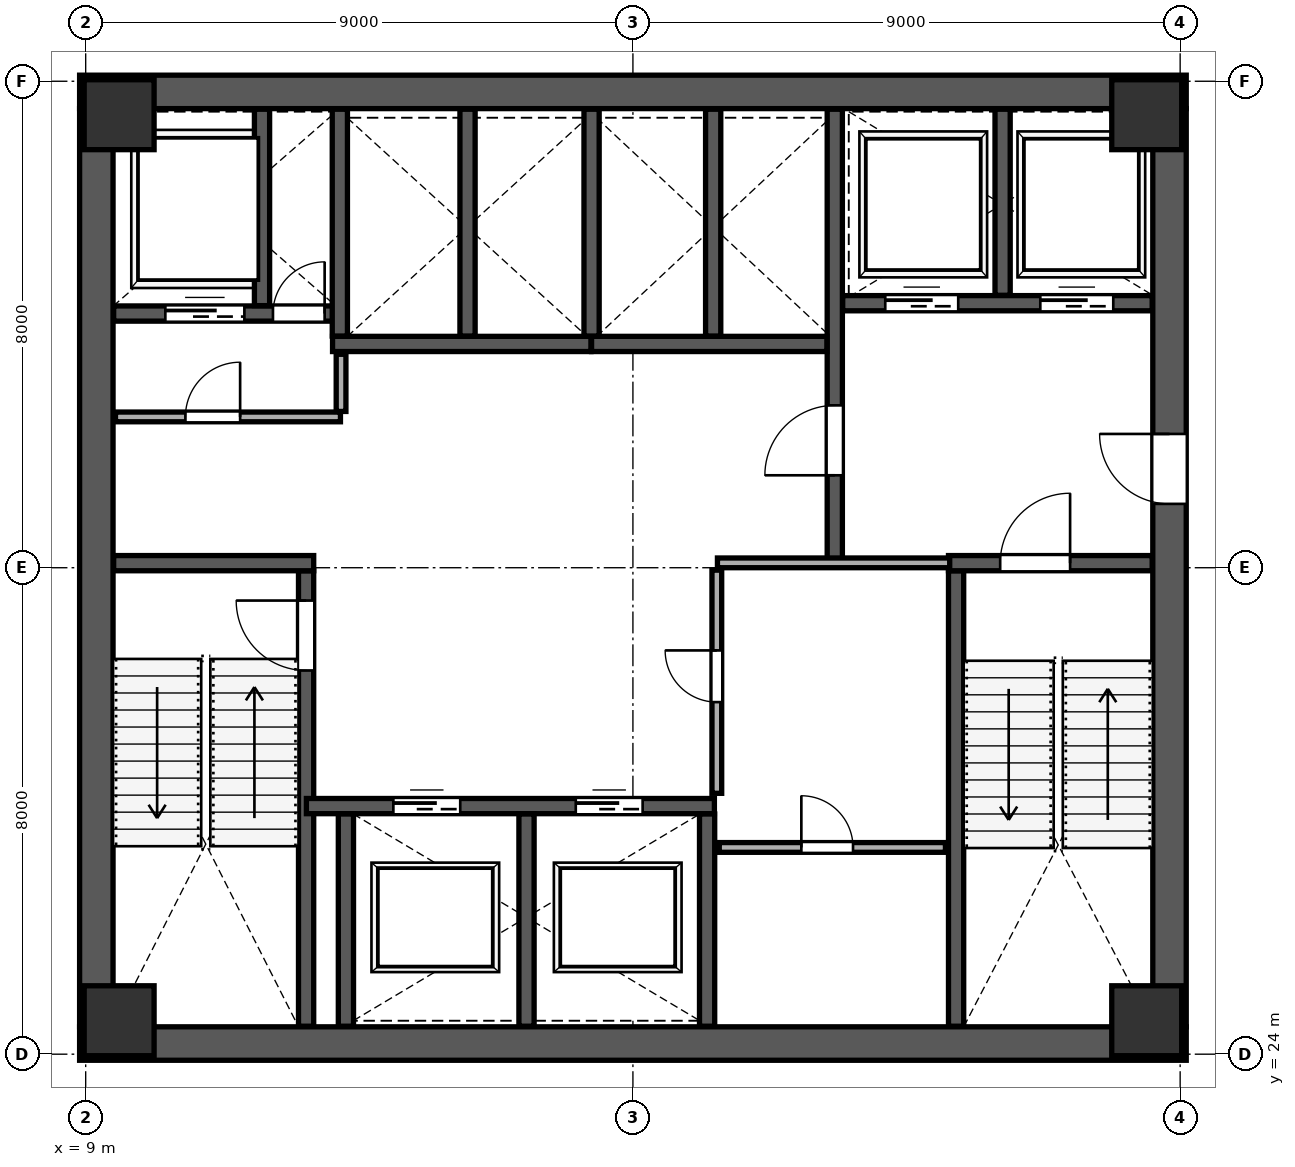
"""IFC4 building model, lengths in metres.
Left out: names, types, materials, properties, quantities, classifications, styles, units other than length and angle.
Written with IfcOpenShell. Run it as: python <this file> out.ifc"""

import sys

from ifc_helpers import new_model, si_unit, direction, frame, frame_2d, origin, origin_2d, place, context, subcontext, project, spatial, rectangle, extrude, source, transform, mapped, element, fill, save


model = new_model("IFC4")
c1 = context("Model", 3, precision=1e-05, world=origin(), true_north=direction((0.0, 1.0)))
c2 = subcontext(c1, "Body", "Model", "MODEL_VIEW")
j1 = project(units=[si_unit("LENGTHUNIT", "METRE"), si_unit("PLANEANGLEUNIT", "RADIAN")], contexts=[c1])
p1 = place(None, origin())
s1 = spatial("IfcSite", under=j1, at=p1, CompositionType="ELEMENT")
p2 = place(p1, origin())
s2 = spatial("IfcBuilding", under=s1, at=p2, CompositionType="ELEMENT")
p3 = place(p2, frame((0.0, 0.0, 70.6)))
s3 = spatial("IfcBuildingStorey", under=s2, at=p3, CompositionType="ELEMENT", Elevation=70.6)
m1 = source(origin(), c2, "Body", "SweptSolid", [
    extrude(rectangle(XDim=1.15, YDim=1.15, at=origin_2d()), origin(), (0.0, 0.0, 1.0), 4.198),
])
for number, where, z_axis, x_axis in (
    (1, (9.55, 24.55, 0.001), (0.0, 0.0, 1.0), (1.0, 0.0, 0.0)),
    (2, (26.45, 24.55, 0.001), (0.0, 0.0, 1.0), (1.0, 0.0, 0.0)),
    (3, (9.55, 39.45, 0.001), (0.0, 0.0, 1.0), (1.0, 0.0, 0.0)),
    (4, (26.45, 39.45, 0.001), (0.0, 0.0, 1.0), (1.0, 0.0, 0.0)),
):
    element("IfcColumn", number, at=place(p3, frame(where, z_axis=z_axis, x_axis=x_axis)), inside=s3, PredefinedType="COLUMN", context=c2, shape_type="MappedRepresentation", body=[
        mapped(m1, transform((0.0, 0.0, 0.0), scale=1.0)),
    ])
p4 = place(p3, frame((9.175, 24.45, 0.0), z_axis=(0.0, 0.0, 1.0), x_axis=(0.0, 1.0, 0.0)))
e5 = element("IfcWall", 5, at=p4, inside=s3, PredefinedType="SHEAR", context=c2, shape_type="SweptSolid", body=[
    extrude(rectangle(XDim=15.1, YDim=0.55, at=frame_2d((7.55, 0.0))), origin(), (0.0, 0.0, 1.0), 3.96),
])
p5 = place(p3, frame((26.825, 24.45, 0.0), z_axis=(0.0, 0.0, 1.0), x_axis=(0.0, 1.0, 0.0)))
e6 = element("IfcWall", 6, at=p5, inside=s3, PredefinedType="SHEAR", context=c2, shape_type="SweptSolid", body=[
    extrude(rectangle(XDim=15.1, YDim=0.55, at=frame_2d((7.55, 0.0))), origin(), (0.0, 0.0, 1.0), 3.96),
])
p6 = place(p5, frame((8.6, 0.0, 0.0)))
e7 = element("IfcOpeningElement", 7, at=p6, cuts=e6, PredefinedType="OPENING", context=c2, shape_type="SweptSolid", body=[
    extrude(rectangle(XDim=1.15, YDim=2.2, at=frame_2d((0.575, 1.1))), frame((0.0, 0.285, 0.0), z_axis=(0.0, -1.0, 0.0), x_axis=(1.0, 0.0, 0.0)), (0.0, 0.0, 1.0), 0.57),
])
for number, where, z_axis, x_axis in (
    (8, (8.9, 24.175, 0.0), (0.0, 0.0, 1.0), (1.0, 0.0, 0.0)),
    (9, (8.9, 39.825, 0.0), (0.0, 0.0, 1.0), (1.0, 0.0, 0.0)),
):
    element("IfcWall", number, at=place(p3, frame(where, z_axis=z_axis, x_axis=x_axis)), inside=s3, PredefinedType="SHEAR", context=c2, shape_type="SweptSolid", body=[
        extrude(rectangle(XDim=18.2, YDim=0.55, at=frame_2d((9.1, 0.0))), origin(), (0.0, 0.0, 1.0), 3.96),
    ])
p7 = place(p3, frame((12.625, 24.46, 0.0), z_axis=(0.0, 0.0, 1.0), x_axis=(0.0, 1.0, 0.0)))
e10 = element("IfcWall", 10, at=p7, inside=s3, PredefinedType="SHEAR", context=c2, shape_type="SweptSolid", body=[
    extrude(rectangle(XDim=7.49, YDim=0.25, at=frame_2d((3.745, 0.0))), origin(), (0.0, 0.0, 1.0), 3.96),
])
p8 = place(p7, frame((5.85, 0.0, 0.0)))
e11 = element("IfcOpeningElement", 11, at=p8, cuts=e10, PredefinedType="OPENING", context=c2, shape_type="SweptSolid", body=[
    extrude(rectangle(XDim=1.15, YDim=2.2, at=frame_2d((0.575, 1.1))), frame((0.0, 0.135, 0.0), z_axis=(0.0, -1.0, 0.0), x_axis=(1.0, 0.0, 0.0)), (0.0, 0.0, 1.0), 0.27),
])
p9 = place(p3, frame((9.46, 32.075, 0.0), z_axis=(0.0, 0.0, 1.0), x_axis=(1.0, 0.0, 0.0)))
e12 = element("IfcWall", 12, at=p9, inside=s3, PredefinedType="SHEAR", context=c2, shape_type="SweptSolid", body=[
    extrude(rectangle(XDim=3.29, YDim=0.25, at=frame_2d((1.645, 0.0))), origin(), (0.0, 0.0, 1.0), 3.96),
])
p10 = place(p3, frame((23.315, 24.46, 0.0), z_axis=(0.0, 0.0, 1.0), x_axis=(0.0, 1.0, 0.0)))
e13 = element("IfcWall", 13, at=p10, inside=s3, PredefinedType="SHEAR", context=c2, shape_type="SweptSolid", body=[
    extrude(rectangle(XDim=7.49, YDim=0.25, at=frame_2d((3.745, 0.0))), origin(), (0.0, 0.0, 1.0), 3.96),
])
p11 = place(p3, frame((23.19, 32.075, 0.0), z_axis=(0.0, 0.0, 1.0), x_axis=(1.0, 0.0, 0.0)))
e14 = element("IfcWall", 14, at=p11, inside=s3, PredefinedType="SHEAR", context=c2, shape_type="SweptSolid", body=[
    extrude(rectangle(XDim=3.35, YDim=0.25, at=frame_2d((1.675, 0.0))), origin(), (0.0, 0.0, 1.0), 3.96),
])
p12 = place(p11, frame((0.85, 0.0, 0.0)))
e15 = element("IfcOpeningElement", 15, at=p12, cuts=e14, PredefinedType="OPENING", context=c2, shape_type="SweptSolid", body=[
    extrude(rectangle(XDim=1.15, YDim=2.2, at=frame_2d((0.575, 1.1))), frame((0.0, 0.135, 0.0), z_axis=(0.0, -1.0, 0.0), x_axis=(1.0, 0.0, 0.0)), (0.0, 0.0, 1.0), 0.27),
])
p13 = place(p3, frame((21.32, 32.12, 0.0), z_axis=(0.0, 0.0, 1.0), x_axis=(0.0, 1.0, 0.0)))
e16 = element("IfcWall", 16, at=p13, inside=s3, PredefinedType="SHEAR", context=c2, shape_type="SweptSolid", body=[
    extrude(rectangle(XDim=7.42, YDim=0.25, at=frame_2d((3.71, 0.0))), origin(), (0.0, 0.0, 1.0), 3.96),
])
p14 = place(p13, frame((1.4, 0.0, 0.0)))
e17 = element("IfcOpeningElement", 17, at=p14, cuts=e16, PredefinedType="OPENING", context=c2, shape_type="SweptSolid", body=[
    extrude(rectangle(XDim=1.15, YDim=2.2, at=frame_2d((0.575, 1.1))), frame((0.0, 0.135, 0.0), z_axis=(0.0, -1.0, 0.0), x_axis=(1.0, 0.0, 0.0)), (0.0, 0.0, 1.0), 0.27),
])
p15 = place(p3, frame((9.46, 36.18, 0.0), z_axis=(0.0, 0.0, 1.0), x_axis=(1.0, 0.0, 0.0)))
e18 = element("IfcWall", 18, at=p15, inside=s3, PredefinedType="SHEAR", context=c2, shape_type="SweptSolid", body=[
    extrude(rectangle(XDim=3.79, YDim=0.25, at=frame_2d((1.895, 0.0))), origin(), (0.0, 0.0, 1.0), 3.96),
])
p16 = place(p15, frame((2.62, 0.0, 0.0)))
e19 = element("IfcOpeningElement", 19, at=p16, cuts=e18, PredefinedType="OPENING", context=c2, shape_type="SweptSolid", body=[
    extrude(rectangle(XDim=0.85, YDim=2.1, at=frame_2d((0.425, 1.05))), frame((0.0, 0.135, 0.0), z_axis=(0.0, -1.0, 0.0), x_axis=(1.0, 0.0, 0.0)), (0.0, 0.0, 1.0), 0.27),
])
p17 = place(p15, frame((0.85, 0.0, 0.0)))
e20 = element("IfcOpeningElement", 20, at=p17, cuts=e18, PredefinedType="OPENING", context=c2, shape_type="SweptSolid", body=[
    extrude(rectangle(XDim=1.3, YDim=2.25, at=frame_2d((0.65, 1.125))), frame((0.0, 0.135, 0.0), z_axis=(0.0, -1.0, 0.0), x_axis=(1.0, 0.0, 0.0)), (0.0, 0.0, 1.0), 0.27),
])
p18 = place(p3, frame((11.9, 36.31, 0.0), z_axis=(0.0, 0.0, 1.0), x_axis=(0.0, 1.0, 0.0)))
e21 = element("IfcWall", 21, at=p18, inside=s3, PredefinedType="SHEAR", context=c2, shape_type="SweptSolid", body=[
    extrude(rectangle(XDim=3.23, YDim=0.25, at=frame_2d((1.615, 0.0))), origin(), (0.0, 0.0, 1.0), 3.96),
])
p19 = place(p3, frame((21.45, 36.35, 0.0), z_axis=(0.0, 0.0, 1.0), x_axis=(1.0, 0.0, 0.0)))
e22 = element("IfcWall", 22, at=p19, inside=s3, PredefinedType="SHEAR", context=c2, shape_type="SweptSolid", body=[
    extrude(rectangle(XDim=5.09, YDim=0.25, at=frame_2d((2.545, 0.0))), origin(), (0.0, 0.0, 1.0), 3.96),
])
p20 = place(p19, frame((0.7, 0.0, 0.0)))
e23 = element("IfcOpeningElement", 23, at=p20, cuts=e22, PredefinedType="OPENING", context=c2, shape_type="SweptSolid", body=[
    extrude(rectangle(XDim=1.2, YDim=2.2, at=frame_2d((0.6, 1.1))), frame((0.0, 0.135, 0.0), z_axis=(0.0, -1.0, 0.0), x_axis=(1.0, 0.0, 0.0)), (0.0, 0.0, 1.0), 0.27),
])
p21 = place(p19, frame((3.25, 0.0, 0.0)))
e24 = element("IfcOpeningElement", 24, at=p21, cuts=e22, PredefinedType="OPENING", context=c2, shape_type="SweptSolid", body=[
    extrude(rectangle(XDim=1.2, YDim=2.2, at=frame_2d((0.6, 1.1))), frame((0.0, 0.135, 0.0), z_axis=(0.0, -1.0, 0.0), x_axis=(1.0, 0.0, 0.0)), (0.0, 0.0, 1.0), 0.27),
])
p22 = place(p3, frame((24.08, 36.48, 0.0), z_axis=(0.0, 0.0, 1.0), x_axis=(0.0, 1.0, 0.0)))
e25 = element("IfcWall", 25, at=p22, inside=s3, PredefinedType="SHEAR", context=c2, shape_type="SweptSolid", body=[
    extrude(rectangle(XDim=3.06, YDim=0.25, at=frame_2d((1.53, 0.0))), origin(), (0.0, 0.0, 1.0), 3.96),
])
p23 = place(p3, frame((12.63, 28.08, 0.0), z_axis=(0.0, 0.0, 1.0), x_axis=(1.0, 0.0, 0.0)))
e26 = element("IfcWall", 26, at=p23, inside=s3, PredefinedType="SHEAR", context=c2, shape_type="SweptSolid", body=[
    extrude(rectangle(XDim=6.71, YDim=0.25, at=frame_2d((3.355, 0.0))), origin(), (0.0, 0.0, 1.0), 3.96),
])
p24 = place(p23, frame((1.43, 0.0, 0.0)))
e27 = element("IfcOpeningElement", 27, at=p24, cuts=e26, PredefinedType="OPENING", context=c2, shape_type="SweptSolid", body=[
    extrude(rectangle(XDim=1.1, YDim=2.2, at=frame_2d((0.55, 1.1))), frame((0.0, 0.135, 0.0), z_axis=(0.0, -1.0, 0.0), x_axis=(1.0, 0.0, 0.0)), (0.0, 0.0, 1.0), 0.27),
])
p25 = place(p23, frame((4.43, 0.0, 0.0)))
e28 = element("IfcOpeningElement", 28, at=p25, cuts=e26, PredefinedType="OPENING", context=c2, shape_type="SweptSolid", body=[
    extrude(rectangle(XDim=1.1, YDim=2.2, at=frame_2d((0.55, 1.1))), frame((0.0, 0.135, 0.0), z_axis=(0.0, -1.0, 0.0), x_axis=(1.0, 0.0, 0.0)), (0.0, 0.0, 1.0), 0.27),
])
for number, where, z_axis, x_axis in (
    (29, (13.28, 24.46, 0.0), (0.0, 0.0, 1.0), (0.0, 1.0, 0.0)),
    (30, (16.25, 24.46, 0.0), (0.0, 0.0, 1.0), (0.0, 1.0, 0.0)),
    (31, (19.22, 24.46, 0.0), (0.0, 0.0, 1.0), (0.0, 1.0, 0.0)),
):
    element("IfcWall", number, at=place(p3, frame(where, z_axis=z_axis, x_axis=x_axis)), inside=s3, PredefinedType="SHEAR", context=c2, shape_type="SweptSolid", body=[
        extrude(rectangle(XDim=3.49, YDim=0.25, at=frame_2d((1.745, 0.0))), origin(), (0.0, 0.0, 1.0), 3.96),
    ])
p26 = place(p3, frame((13.06, 35.68, 0.0), z_axis=(0.0, 0.0, 1.0), x_axis=(1.0, 0.0, 0.0)))
e32 = element("IfcWall", 32, at=p26, inside=s3, PredefinedType="SHEAR", context=c2, shape_type="SweptSolid", body=[
    extrude(rectangle(XDim=4.25, YDim=0.25, at=frame_2d((2.125, 0.0))), origin(), (0.0, 0.0, 1.0), 3.96),
])
for number, where, z_axis, x_axis in (
    (33, (13.18, 35.81, 0.0), (0.0, 0.0, 1.0), (0.0, 1.0, 0.0)),
    (34, (15.28, 35.81, 0.0), (0.0, 0.0, 1.0), (0.0, 1.0, 0.0)),
):
    element("IfcWall", number, at=place(p3, frame(where, z_axis=z_axis, x_axis=x_axis)), inside=s3, PredefinedType="SHEAR", context=c2, shape_type="SweptSolid", body=[
        extrude(rectangle(XDim=3.73, YDim=0.25, at=frame_2d((1.865, 0.0))), origin(), (0.0, 0.0, 1.0), 3.96),
    ])
p27 = place(p3, frame((17.32, 35.68, 0.0), z_axis=(0.0, 0.0, 1.0), x_axis=(1.0, 0.0, 0.0)))
e35 = element("IfcWall", 35, at=p27, inside=s3, PredefinedType="SHEAR", context=c2, shape_type="SweptSolid", body=[
    extrude(rectangle(XDim=3.87, YDim=0.25, at=frame_2d((1.935, 0.0))), origin(), (0.0, 0.0, 1.0), 3.96),
])
for number, where, z_axis, x_axis in (
    (36, (17.32, 35.81, 0.0), (0.0, 0.0, 1.0), (0.0, 1.0, 0.0)),
    (37, (19.32, 35.81, 0.0), (0.0, 0.0, 1.0), (0.0, 1.0, 0.0)),
):
    element("IfcWall", number, at=place(p3, frame(where, z_axis=z_axis, x_axis=x_axis)), inside=s3, PredefinedType="SHEAR", context=c2, shape_type="SweptSolid", body=[
        extrude(rectangle(XDim=3.73, YDim=0.25, at=frame_2d((1.865, 0.0))), origin(), (0.0, 0.0, 1.0), 3.96),
    ])
p28 = place(p3, frame((9.49, 34.48, 0.0), z_axis=(0.0, 0.0, 1.0), x_axis=(1.0, 0.0, 0.0)))
e38 = element("IfcWall", 38, at=p28, inside=s3, PredefinedType="PARTITIONING", context=c2, shape_type="SweptSolid", body=[
    extrude(rectangle(XDim=3.7, YDim=0.16, at=frame_2d((1.85, 0.0))), origin(), (0.0, 0.0, 1.0), 3.96),
])
p29 = place(p28, frame((1.15, 0.0, 0.0)))
e39 = element("IfcOpeningElement", 39, at=p29, cuts=e38, PredefinedType="OPENING", context=c2, shape_type="SweptSolid", body=[
    extrude(rectangle(XDim=0.9, YDim=2.15, at=frame_2d((0.45, 1.075))), frame((0.0, 0.09, 0.0), z_axis=(0.0, -1.0, 0.0), x_axis=(1.0, 0.0, 0.0)), (0.0, 0.0, 1.0), 0.18),
])
p30 = place(p3, frame((13.2, 34.57, 0.0), z_axis=(0.0, 0.0, 1.0), x_axis=(0.0, 1.0, 0.0)))
e40 = element("IfcWall", 40, at=p30, inside=s3, PredefinedType="PARTITIONING", context=c2, shape_type="SweptSolid", body=[
    extrude(rectangle(XDim=0.94, YDim=0.16, at=frame_2d((0.47, 0.0))), origin(), (0.0, 0.0, 1.0), 3.96),
])
p31 = place(p3, frame((19.39, 32.08, 0.0), z_axis=(0.0, 0.0, 1.0), x_axis=(1.0, 0.0, 0.0)))
e41 = element("IfcWall", 41, at=p31, inside=s3, PredefinedType="PARTITIONING", context=c2, shape_type="SweptSolid", body=[
    extrude(rectangle(XDim=3.82, YDim=0.16, at=frame_2d((1.91, 0.0))), origin(), (0.0, 0.0, 1.0), 3.96),
])
p32 = place(p3, frame((19.38, 28.29, 0.0), z_axis=(0.0, 0.0, 1.0), x_axis=(0.0, 1.0, 0.0)))
e42 = element("IfcWall", 42, at=p32, inside=s3, PredefinedType="PARTITIONING", context=c2, shape_type="SweptSolid", body=[
    extrude(rectangle(XDim=3.67, YDim=0.16, at=frame_2d((1.835, 0.0))), origin(), (0.0, 0.0, 1.0), 3.96),
])
p33 = place(p32, frame((1.5, 0.0, 0.0)))
e43 = element("IfcOpeningElement", 43, at=p33, cuts=e42, PredefinedType="OPENING", context=c2, shape_type="SweptSolid", body=[
    extrude(rectangle(XDim=0.85, YDim=2.1, at=frame_2d((0.425, 1.05))), frame((0.0, 0.09, 0.0), z_axis=(0.0, -1.0, 0.0), x_axis=(1.0, 0.0, 0.0)), (0.0, 0.0, 1.0), 0.18),
])
p34 = place(p3, frame((19.42, 27.4, 0.0), z_axis=(0.0, 0.0, 1.0), x_axis=(1.0, 0.0, 0.0)))
e44 = element("IfcWall", 44, at=p34, inside=s3, PredefinedType="PARTITIONING", context=c2, shape_type="SweptSolid", body=[
    extrude(rectangle(XDim=3.72, YDim=0.16, at=frame_2d((1.86, 0.0))), origin(), (0.0, 0.0, 1.0), 3.96),
])
p35 = place(p34, frame((1.35, 0.0, 0.0)))
e45 = element("IfcOpeningElement", 45, at=p35, cuts=e44, PredefinedType="OPENING", context=c2, shape_type="SweptSolid", body=[
    extrude(rectangle(XDim=0.85, YDim=2.1, at=frame_2d((0.425, 1.05))), frame((0.0, 0.09, 0.0), z_axis=(0.0, -1.0, 0.0), x_axis=(1.0, 0.0, 0.0)), (0.0, 0.0, 1.0), 0.18),
])
p36 = place(p3, frame((27.595, 13.022, 0.0), z_axis=(0.0, 0.0, 1.0), x_axis=(0.130532558102, 0.991444023269, 0.0)))
e46 = element("IfcWall", 46, at=p36, inside=s3, PredefinedType="PARTITIONING", context=c2, shape_type="SweptSolid", body=[
    extrude(rectangle(XDim=14.08, YDim=0.16, at=frame_2d((7.04, 0.0))), origin(), (0.0, 0.0, 1.0), 3.96),
])
m2 = source(origin(), c2, "Body", "SweptSolid", [
    extrude(rectangle(XDim=1.15, YDim=2.2, at=frame_2d((0.575, 1.1))), frame((0.0, 0.025, 0.0), z_axis=(0.0, -1.0, 0.0), x_axis=(1.0, 0.0, 0.0)), (0.0, 0.0, 1.0), 0.05),
])
p37 = place(p8, origin())
e47 = element("IfcDoor", 47, at=p37, inside=s3, OperationType="SINGLE_SWING_RIGHT", PredefinedType="DOOR", context=c2, shape_type="MappedRepresentation", body=[
    mapped(m2, transform((0.0, 0.0, 0.0), scale=1.0)),
])
fill(e11, e47)
m3 = source(origin(), c2, "Body", "SweptSolid", [
    extrude(rectangle(XDim=1.15, YDim=2.2, at=frame_2d((0.575, 1.1))), frame((0.0, 0.025, 0.0), z_axis=(0.0, -1.0, 0.0), x_axis=(1.0, 0.0, 0.0)), (0.0, 0.0, 1.0), 0.05),
])
p38 = place(p14, origin())
e48 = element("IfcDoor", 48, at=p38, inside=s3, OperationType="SINGLE_SWING_LEFT", PredefinedType="DOOR", context=c2, shape_type="MappedRepresentation", body=[
    mapped(m3, transform((0.0, 0.0, 0.0), scale=1.0)),
])
fill(e17, e48)
p39 = place(p12, origin())
e49 = element("IfcDoor", 49, at=p39, inside=s3, OperationType="SINGLE_SWING_RIGHT", PredefinedType="DOOR", context=c2, shape_type="MappedRepresentation", body=[
    mapped(m2, transform((0.0, 0.0, 0.0), scale=1.0)),
])
fill(e15, e49)
p40 = place(p6, origin())
e50 = element("IfcDoor", 50, at=p40, inside=s3, OperationType="SINGLE_SWING_RIGHT", PredefinedType="DOOR", context=c2, shape_type="MappedRepresentation", body=[
    mapped(m3, transform((0.0, 0.0, 0.0), scale=1.0)),
])
fill(e7, e50)
m4 = source(origin(), c2, "Body", "SweptSolid", [
    extrude(rectangle(XDim=0.85, YDim=2.1, at=frame_2d((0.425, 1.05))), frame((0.0, 0.025, 0.0), z_axis=(0.0, -1.0, 0.0), x_axis=(1.0, 0.0, 0.0)), (0.0, 0.0, 1.0), 0.05),
])
p41 = place(p16, origin())
e51 = element("IfcDoor", 51, at=p41, inside=s3, OperationType="SINGLE_SWING_RIGHT", PredefinedType="DOOR", context=c2, shape_type="MappedRepresentation", body=[
    mapped(m4, transform((0.0, 0.0, 0.0), scale=1.0)),
])
fill(e19, e51)
m5 = source(origin(), c2, "Body", "SweptSolid", [
    extrude(rectangle(XDim=1.1, YDim=2.2, at=frame_2d((0.55, 1.1))), frame((0.0, 0.025, 0.0), z_axis=(0.0, -1.0, 0.0), x_axis=(1.0, 0.0, 0.0)), (0.0, 0.0, 1.0), 0.05),
])
p42 = place(p24, origin())
e52 = element("IfcDoor", 52, at=p42, inside=s3, OperationType="SLIDING_TO_LEFT", PredefinedType="DOOR", context=c2, shape_type="MappedRepresentation", body=[
    mapped(m5, transform((0.0, 0.0, 0.0), scale=1.0)),
])
fill(e27, e52)
p43 = place(p25, origin())
e53 = element("IfcDoor", 53, at=p43, inside=s3, OperationType="SLIDING_TO_RIGHT", PredefinedType="DOOR", context=c2, shape_type="MappedRepresentation", body=[
    mapped(m5, transform((0.0, 0.0, 0.0), scale=1.0)),
])
fill(e28, e53)
m6 = source(origin(), c2, "Body", "SweptSolid", [
    extrude(rectangle(XDim=1.2, YDim=2.2, at=frame_2d((0.6, 1.1))), frame((0.0, 0.025, 0.0), z_axis=(0.0, -1.0, 0.0), x_axis=(1.0, 0.0, 0.0)), (0.0, 0.0, 1.0), 0.05),
])
p44 = place(p20, origin())
e54 = element("IfcDoor", 54, at=p44, inside=s3, OperationType="SLIDING_TO_LEFT", PredefinedType="DOOR", context=c2, shape_type="MappedRepresentation", body=[
    mapped(m6, transform((0.0, 0.0, 0.0), scale=1.0)),
])
fill(e23, e54)
p45 = place(p21, origin())
e55 = element("IfcDoor", 55, at=p45, inside=s3, OperationType="SLIDING_TO_RIGHT", PredefinedType="DOOR", context=c2, shape_type="MappedRepresentation", body=[
    mapped(m6, transform((0.0, 0.0, 0.0), scale=1.0)),
])
fill(e24, e55)
m7 = source(origin(), c2, "Body", "SweptSolid", [
    extrude(rectangle(XDim=1.3, YDim=2.25, at=frame_2d((0.65, 1.125))), frame((0.0, 0.025, 0.0), z_axis=(0.0, -1.0, 0.0), x_axis=(1.0, 0.0, 0.0)), (0.0, 0.0, 1.0), 0.05),
])
p46 = place(p17, origin())
e56 = element("IfcDoor", 56, at=p46, inside=s3, OperationType="SLIDING_TO_LEFT", PredefinedType="DOOR", context=c2, shape_type="MappedRepresentation", body=[
    mapped(m7, transform((0.0, 0.0, 0.0), scale=1.0)),
])
fill(e20, e56)
m8 = source(origin(), c2, "Body", "SweptSolid", [
    extrude(rectangle(XDim=0.9, YDim=2.15, at=frame_2d((0.45, 1.075))), frame((0.0, 0.025, 0.0), z_axis=(0.0, -1.0, 0.0), x_axis=(1.0, 0.0, 0.0)), (0.0, 0.0, 1.0), 0.05),
])
p47 = place(p29, origin())
e57 = element("IfcDoor", 57, at=p47, inside=s3, OperationType="SINGLE_SWING_RIGHT", PredefinedType="DOOR", context=c2, shape_type="MappedRepresentation", body=[
    mapped(m8, transform((0.0, 0.0, 0.0), scale=1.0)),
])
fill(e39, e57)
p48 = place(p35, origin())
e58 = element("IfcDoor", 58, at=p48, inside=s3, OperationType="SINGLE_SWING_LEFT", PredefinedType="DOOR", context=c2, shape_type="MappedRepresentation", body=[
    mapped(m4, transform((0.0, 0.0, 0.0), scale=1.0)),
])
fill(e45, e58)
p49 = place(p33, origin())
e59 = element("IfcDoor", 59, at=p49, inside=s3, OperationType="SINGLE_SWING_RIGHT", PredefinedType="DOOR", context=c2, shape_type="MappedRepresentation", body=[
    mapped(m4, transform((0.0, 0.0, 0.0), scale=1.0)),
])
fill(e43, e59)
save(model, sys.argv[1])
